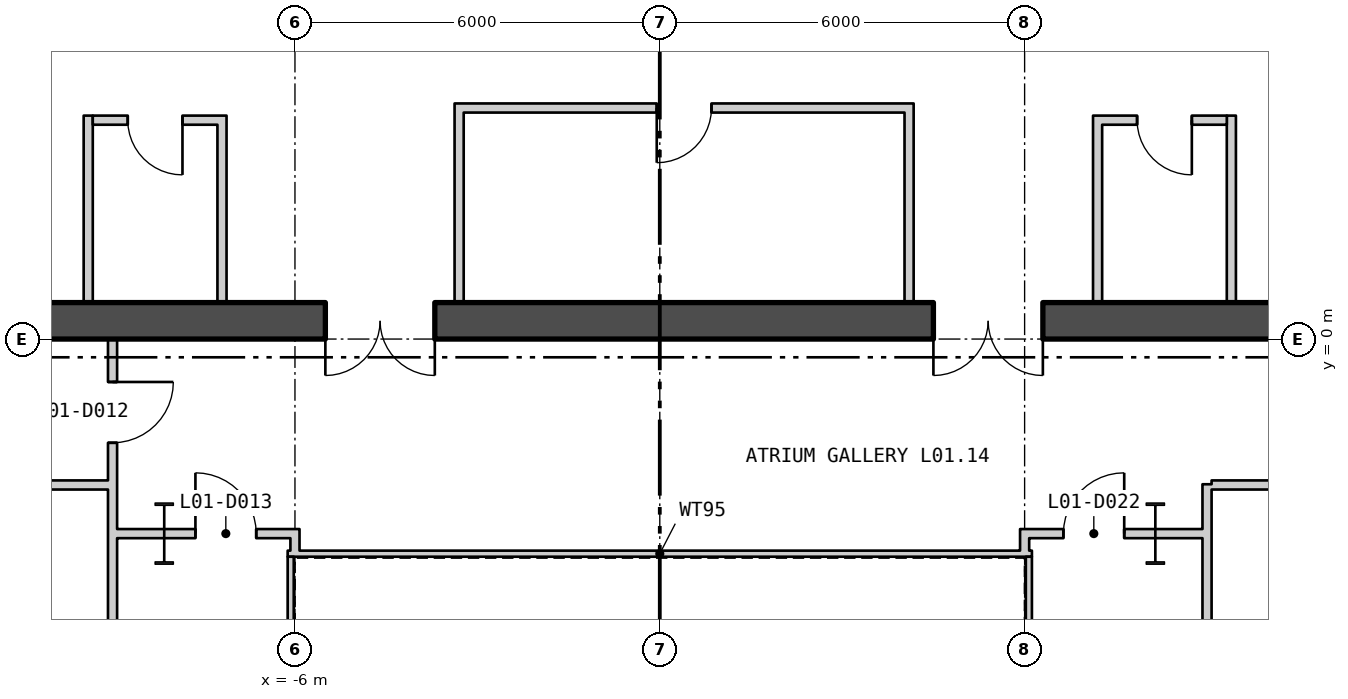
"""IFC4 building model, lengths in metres.
Left out: names, types, materials, properties, quantities, classifications, styles, units other than length and angle.
Written with IfcOpenShell. Run it as: python <this file> out.ifc"""

import sys

from ifc_helpers import new_model, si_unit, direction, frame, frame_2d, origin, origin_2d, place, context, subcontext, project, spatial, rectangle, i_section, extrude, element, fill, save


model = new_model("IFC4")
c1 = context("Model", 3, precision=1e-05, world=origin(), true_north=direction((0.0, 1.0)))
c2 = subcontext(c1, "Body", "Model", "MODEL_VIEW")
j1 = project(units=[si_unit("LENGTHUNIT", "METRE"), si_unit("PLANEANGLEUNIT", "RADIAN")], contexts=[c1])
p1 = place(None, origin())
s1 = spatial("IfcSite", under=j1, at=p1, CompositionType="ELEMENT")
p2 = place(p1, origin())
s2 = spatial("IfcBuilding", under=s1, at=p2, CompositionType="ELEMENT")
p3 = place(p2, frame((0.0, 0.0, 8.4)))
s3 = spatial("IfcBuildingStorey", under=s2, at=p3, CompositionType="ELEMENT", Elevation=8.4)
for number, where, z_axis, x_axis in (
    (1, (8.15, -3.2, 0.0), (0.0, 0.0, 1.0), (1.0, 0.0, 0.0)),
    (2, (-8.15, -3.2, 0.0), (0.0, 0.0, 1.0), (1.0, 0.0, 0.0)),
):
    element("IfcColumn", number, at=place(p3, frame(where, z_axis=z_axis, x_axis=x_axis)), inside=s3, PredefinedType="COLUMN", context=c2, shape_type="SweptSolid", body=[
        extrude(i_section(OverallWidth=0.302, OverallDepth=1.008, WebThickness=0.021, FlangeThickness=0.04, at=origin_2d()), origin(), (0.0, 0.0, 1.0), 5.1),
    ])
p4 = place(p3, frame((6.07, -11.62, 0.0), z_axis=(0.0, 0.0, 1.0), x_axis=(0.0, 1.0, 0.0)))
e3 = element("IfcWall", 3, at=p4, inside=s3, PredefinedType="PARTITIONING", context=c2, shape_type="SweptSolid", body=[
    extrude(rectangle(XDim=8.04, YDim=0.1, at=frame_2d((4.02, 0.0))), origin(), (0.0, 0.0, 1.0), 4.88),
])
p5 = place(p3, frame((6.12, -3.53, 0.0), z_axis=(0.0, 0.0, 1.0), x_axis=(-1.0, 0.0, 0.0)))
e4 = element("IfcWall", 4, at=p5, inside=s3, PredefinedType="PARTITIONING", context=c2, shape_type="SweptSolid", body=[
    extrude(rectangle(XDim=12.24, YDim=0.1, at=frame_2d((6.12, 0.0))), origin(), (0.0, 0.0, 1.0), 4.88),
])
p6 = place(p3, frame((-6.07, -3.58, 0.0), z_axis=(0.0, 0.0, 1.0), x_axis=(0.0, -1.0, 0.0)))
e5 = element("IfcWall", 5, at=p6, inside=s3, PredefinedType="PARTITIONING", context=c2, shape_type="SweptSolid", body=[
    extrude(rectangle(XDim=8.04, YDim=0.1, at=frame_2d((4.02, 0.0))), origin(), (0.0, 0.0, 1.0), 4.88),
])
p7 = place(p3, frame((-17.5, 0.3, 0.0), z_axis=(0.0, 0.0, 1.0), x_axis=(1.0, 0.0, 0.0)))
e6 = element("IfcWall", 6, at=p7, inside=s3, PredefinedType="SHEAR", context=c2, shape_type="SweptSolid", body=[
    extrude(rectangle(XDim=35.0, YDim=0.6, at=frame_2d((17.5, 0.0))), origin(), (0.0, 0.0, 1.0), 4.88),
])
p8 = place(p7, frame((12.0, 0.0, 0.0)))
e7 = element("IfcOpeningElement", 7, at=p8, cuts=e6, PredefinedType="OPENING", context=c2, shape_type="SweptSolid", body=[
    extrude(rectangle(XDim=1.8, YDim=2.4, at=frame_2d((0.9, 1.2))), frame((0.0, 0.31, 0.0), z_axis=(0.0, -1.0, 0.0), x_axis=(1.0, 0.0, 0.0)), (0.0, 0.0, 1.0), 0.62),
])
p9 = place(p7, frame((22.0, 0.0, 0.0)))
e8 = element("IfcOpeningElement", 8, at=p9, cuts=e6, PredefinedType="OPENING", context=c2, shape_type="SweptSolid", body=[
    extrude(rectangle(XDim=1.8, YDim=2.4, at=frame_2d((0.9, 1.2))), frame((0.0, 0.31, 0.0), z_axis=(0.0, -1.0, 0.0), x_axis=(1.0, 0.0, 0.0)), (0.0, 0.0, 1.0), 0.62),
])
for number, where, z_axis, x_axis in (
    (9, (7.2, 0.6, 0.0), (0.0, 0.0, 1.0), (0.0, 1.0, 0.0)),
    (10, (9.4, 0.6, 0.0), (0.0, 0.0, 1.0), (0.0, 1.0, 0.0)),
):
    element("IfcWall", number, at=place(p3, frame(where, z_axis=z_axis, x_axis=x_axis)), inside=s3, PredefinedType="PARTITIONING", context=c2, shape_type="SweptSolid", body=[
        extrude(rectangle(XDim=3.075, YDim=0.15, at=frame_2d((1.538, 0.0))), origin(), (0.0, 0.0, 1.0), 4.88),
    ])
p10 = place(p3, frame((7.275, 3.6, 0.0), z_axis=(0.0, 0.0, 1.0), x_axis=(1.0, 0.0, 0.0)))
e11 = element("IfcWall", 11, at=p10, inside=s3, PredefinedType="PARTITIONING", context=c2, shape_type="SweptSolid", body=[
    extrude(rectangle(XDim=2.05, YDim=0.15, at=frame_2d((1.025, 0.0))), origin(), (0.0, 0.0, 1.0), 4.88),
])
p11 = place(p10, frame((0.575, 0.0, 0.0)))
e12 = element("IfcOpeningElement", 12, at=p11, cuts=e11, PredefinedType="OPENING", context=c2, shape_type="SweptSolid", body=[
    extrude(rectangle(XDim=0.9, YDim=2.1, at=frame_2d((0.45, 1.05))), frame((0.0, 0.085, 0.0), z_axis=(0.0, -1.0, 0.0), x_axis=(1.0, 0.0, 0.0)), (0.0, 0.0, 1.0), 0.17),
])
for number, where, z_axis, x_axis in (
    (13, (-3.3, 0.6, 0.0), (0.0, 0.0, 1.0), (0.0, 1.0, 0.0)),
    (14, (4.1, 0.6, 0.0), (0.0, 0.0, 1.0), (0.0, 1.0, 0.0)),
):
    element("IfcWall", number, at=place(p3, frame(where, z_axis=z_axis, x_axis=x_axis)), inside=s3, PredefinedType="PARTITIONING", context=c2, shape_type="SweptSolid", body=[
        extrude(rectangle(XDim=3.275, YDim=0.15, at=frame_2d((1.637, 0.0))), origin(), (0.0, 0.0, 1.0), 4.88),
    ])
p12 = place(p3, frame((-3.225, 3.8, 0.0), z_axis=(0.0, 0.0, 1.0), x_axis=(1.0, 0.0, 0.0)))
e15 = element("IfcWall", 15, at=p12, inside=s3, PredefinedType="PARTITIONING", context=c2, shape_type="SweptSolid", body=[
    extrude(rectangle(XDim=7.25, YDim=0.15, at=frame_2d((3.625, 0.0))), origin(), (0.0, 0.0, 1.0), 4.88),
])
p13 = place(p12, frame((3.175, 0.0, 0.0)))
e16 = element("IfcOpeningElement", 16, at=p13, cuts=e15, PredefinedType="OPENING", context=c2, shape_type="SweptSolid", body=[
    extrude(rectangle(XDim=0.9, YDim=2.1, at=frame_2d((0.45, 1.05))), frame((0.0, 0.085, 0.0), z_axis=(0.0, -1.0, 0.0), x_axis=(1.0, 0.0, 0.0)), (0.0, 0.0, 1.0), 0.17),
])
for number, where, z_axis, x_axis in (
    (17, (-9.4, 0.6, 0.0), (0.0, 0.0, 1.0), (0.0, 1.0, 0.0)),
    (18, (-7.2, 0.6, 0.0), (0.0, 0.0, 1.0), (0.0, 1.0, 0.0)),
):
    element("IfcWall", number, at=place(p3, frame(where, z_axis=z_axis, x_axis=x_axis)), inside=s3, PredefinedType="PARTITIONING", context=c2, shape_type="SweptSolid", body=[
        extrude(rectangle(XDim=3.075, YDim=0.15, at=frame_2d((1.538, 0.0))), origin(), (0.0, 0.0, 1.0), 4.88),
    ])
p14 = place(p3, frame((-9.325, 3.6, 0.0), z_axis=(0.0, 0.0, 1.0), x_axis=(1.0, 0.0, 0.0)))
e19 = element("IfcWall", 19, at=p14, inside=s3, PredefinedType="PARTITIONING", context=c2, shape_type="SweptSolid", body=[
    extrude(rectangle(XDim=2.05, YDim=0.15, at=frame_2d((1.025, 0.0))), origin(), (0.0, 0.0, 1.0), 4.88),
])
p15 = place(p14, frame((0.575, 0.0, 0.0)))
e20 = element("IfcOpeningElement", 20, at=p15, cuts=e19, PredefinedType="OPENING", context=c2, shape_type="SweptSolid", body=[
    extrude(rectangle(XDim=0.9, YDim=2.1, at=frame_2d((0.45, 1.05))), frame((0.0, 0.085, 0.0), z_axis=(0.0, -1.0, 0.0), x_axis=(1.0, 0.0, 0.0)), (0.0, 0.0, 1.0), 0.17),
])
p16 = place(p3, frame((-17.025, -2.4, 0.0), z_axis=(0.0, 0.0, 1.0), x_axis=(1.0, 0.0, 0.0)))
e21 = element("IfcWall", 21, at=p16, inside=s3, PredefinedType="PARTITIONING", context=c2, shape_type="SweptSolid", body=[
    extrude(rectangle(XDim=7.95, YDim=0.15, at=frame_2d((3.975, 0.0))), origin(), (0.0, 0.0, 1.0), 4.88),
])
p17 = place(p16, frame((5.621, 0.0, 0.0)))
e22 = element("IfcOpeningElement", 22, at=p17, cuts=e21, PredefinedType="OPENING", context=c2, shape_type="SweptSolid", body=[
    extrude(rectangle(XDim=1.0, YDim=2.1, at=frame_2d((0.5, 1.05))), frame((0.0, 0.085, 0.0), z_axis=(0.0, -1.0, 0.0), x_axis=(1.0, 0.0, 0.0)), (0.0, 0.0, 1.0), 0.17),
])
p18 = place(p3, frame((-9.0, -13.675, 0.0), z_axis=(0.0, 0.0, 1.0), x_axis=(0.0, 1.0, 0.0)))
e23 = element("IfcWall", 23, at=p18, inside=s3, PredefinedType="PARTITIONING", context=c2, shape_type="SweptSolid", body=[
    extrude(rectangle(XDim=13.675, YDim=0.15, at=frame_2d((6.838, 0.0))), origin(), (0.0, 0.0, 1.0), 4.88),
])
p19 = place(p18, frame((11.969, 0.0, 0.0)))
e24 = element("IfcOpeningElement", 24, at=p19, cuts=e23, PredefinedType="OPENING", context=c2, shape_type="SweptSolid", body=[
    extrude(rectangle(XDim=1.0, YDim=2.1, at=frame_2d((0.5, 1.05))), frame((0.0, 0.085, 0.0), z_axis=(0.0, -1.0, 0.0), x_axis=(1.0, 0.0, 0.0)), (0.0, 0.0, 1.0), 0.17),
])
p20 = place(p3, frame((-8.925, -3.2, 0.0), z_axis=(0.0, 0.0, 1.0), x_axis=(1.0, 0.0, 0.0)))
e25 = element("IfcWall", 25, at=p20, inside=s3, PredefinedType="PARTITIONING", context=c2, shape_type="SweptSolid", body=[
    extrude(rectangle(XDim=0.775, YDim=0.15, at=frame_2d((0.388, 0.0))), origin(), (0.0, 0.0, 1.0), 4.09),
])
p21 = place(p3, frame((-8.15, -3.2, 0.0), z_axis=(0.0, 0.0, 1.0), x_axis=(1.0, 0.0, 0.0)))
e26 = element("IfcWall", 26, at=p21, inside=s3, PredefinedType="PARTITIONING", context=c2, shape_type="SweptSolid", body=[
    extrude(rectangle(XDim=2.225, YDim=0.15, at=frame_2d((1.113, 0.0))), origin(), (0.0, 0.0, 1.0), 3.97),
])
p22 = place(p21, frame((0.513, 0.0, 0.0)))
e27 = element("IfcOpeningElement", 27, at=p22, cuts=e26, PredefinedType="OPENING", context=c2, shape_type="SweptSolid", body=[
    extrude(rectangle(XDim=1.0, YDim=2.1, at=frame_2d((0.5, 1.05))), frame((0.0, 0.085, 0.0), z_axis=(0.0, -1.0, 0.0), x_axis=(1.0, 0.0, 0.0)), (0.0, 0.0, 1.0), 0.17),
])
p23 = place(p3, frame((-6.0, -3.48, 0.0), z_axis=(0.0, 0.0, 1.0), x_axis=(0.0, 1.0, 0.0)))
e28 = element("IfcWall", 28, at=p23, inside=s3, PredefinedType="PARTITIONING", context=c2, shape_type="SweptSolid", body=[
    extrude(rectangle(XDim=0.205, YDim=0.15, at=frame_2d((0.102, 0.0))), origin(), (0.0, 0.0, 1.0), 4.88),
])
p24 = place(p3, frame((5.925, -3.2, 0.0), z_axis=(0.0, 0.0, 1.0), x_axis=(1.0, 0.0, 0.0)))
e29 = element("IfcWall", 29, at=p24, inside=s3, PredefinedType="PARTITIONING", context=c2, shape_type="SweptSolid", body=[
    extrude(rectangle(XDim=2.225, YDim=0.15, at=frame_2d((1.113, 0.0))), origin(), (0.0, 0.0, 1.0), 3.97),
])
p25 = place(p24, frame((0.713, 0.0, 0.0)))
e30 = element("IfcOpeningElement", 30, at=p25, cuts=e29, PredefinedType="OPENING", context=c2, shape_type="SweptSolid", body=[
    extrude(rectangle(XDim=1.0, YDim=2.1, at=frame_2d((0.5, 1.05))), frame((0.0, 0.085, 0.0), z_axis=(0.0, -1.0, 0.0), x_axis=(1.0, 0.0, 0.0)), (0.0, 0.0, 1.0), 0.17),
])
p26 = place(p3, frame((8.15, -3.2, 0.0), z_axis=(0.0, 0.0, 1.0), x_axis=(1.0, 0.0, 0.0)))
e31 = element("IfcWall", 31, at=p26, inside=s3, PredefinedType="PARTITIONING", context=c2, shape_type="SweptSolid", body=[
    extrude(rectangle(XDim=0.775, YDim=0.15, at=frame_2d((0.388, 0.0))), origin(), (0.0, 0.0, 1.0), 4.09),
])
p27 = place(p3, frame((6.0, -3.48, 0.0), z_axis=(0.0, 0.0, 1.0), x_axis=(0.0, 1.0, 0.0)))
e32 = element("IfcWall", 32, at=p27, inside=s3, PredefinedType="PARTITIONING", context=c2, shape_type="SweptSolid", body=[
    extrude(rectangle(XDim=0.205, YDim=0.15, at=frame_2d((0.102, 0.0))), origin(), (0.0, 0.0, 1.0), 4.88),
])
p28 = place(p3, frame((9.0, -13.675, 0.0), z_axis=(0.0, 0.0, 1.0), x_axis=(0.0, 1.0, 0.0)))
e33 = element("IfcWall", 33, at=p28, inside=s3, PredefinedType="PARTITIONING", context=c2, shape_type="SweptSolid", body=[
    extrude(rectangle(XDim=11.287, YDim=0.15, at=frame_2d((5.644, 0.0))), origin(), (0.0, 0.0, 1.0), 4.88),
])
p29 = place(p28, frame((2.498, 0.0, 0.0)))
e34 = element("IfcOpeningElement", 34, at=p29, cuts=e33, PredefinedType="OPENING", context=c2, shape_type="SweptSolid", body=[
    extrude(rectangle(XDim=1.8, YDim=2.1, at=frame_2d((0.9, 1.05))), frame((0.0, 0.085, 0.0), z_axis=(0.0, -1.0, 0.0), x_axis=(1.0, 0.0, 0.0)), (0.0, 0.0, 1.0), 0.17),
])
p30 = place(p3, frame((9.075, -2.4, 0.0), z_axis=(0.0, 0.0, 1.0), x_axis=(1.0, 0.0, 0.0)))
e35 = element("IfcWall", 35, at=p30, inside=s3, PredefinedType="PARTITIONING", context=c2, shape_type="SweptSolid", body=[
    extrude(rectangle(XDim=7.95, YDim=0.15, at=frame_2d((3.975, 0.0))), origin(), (0.0, 0.0, 1.0), 4.88),
])
p31 = place(p30, frame((1.329, 0.0, 0.0)))
e36 = element("IfcOpeningElement", 36, at=p31, cuts=e35, PredefinedType="OPENING", context=c2, shape_type="SweptSolid", body=[
    extrude(rectangle(XDim=1.0, YDim=2.1, at=frame_2d((0.5, 1.05))), frame((0.0, 0.085, 0.0), z_axis=(0.0, -1.0, 0.0), x_axis=(1.0, 0.0, 0.0)), (0.0, 0.0, 1.0), 0.17),
])
p32 = place(p30, frame((5.279, 0.0, 0.0)))
e37 = element("IfcOpeningElement", 37, at=p32, cuts=e35, PredefinedType="OPENING", context=c2, shape_type="SweptSolid", body=[
    extrude(rectangle(XDim=1.0, YDim=2.1, at=frame_2d((0.5, 1.05))), frame((0.0, 0.085, 0.0), z_axis=(0.0, -1.0, 0.0), x_axis=(1.0, 0.0, 0.0)), (0.0, 0.0, 1.0), 0.17),
])
p33 = place(p11, origin())
e38 = element("IfcDoor", 38, at=p33, inside=s3, OperationType="SINGLE_SWING_RIGHT", PredefinedType="DOOR", context=c2, shape_type="SweptSolid", body=[
    extrude(rectangle(XDim=0.9, YDim=2.1, at=frame_2d((0.45, 1.05))), frame((0.0, 0.025, 0.0), z_axis=(0.0, -1.0, 0.0), x_axis=(1.0, 0.0, 0.0)), (0.0, 0.0, 1.0), 0.05),
])
fill(e12, e38)
p34 = place(p13, origin())
e39 = element("IfcDoor", 39, at=p34, inside=s3, OperationType="SINGLE_SWING_LEFT", PredefinedType="DOOR", context=c2, shape_type="SweptSolid", body=[
    extrude(rectangle(XDim=0.9, YDim=2.1, at=frame_2d((0.45, 1.05))), frame((0.0, 0.025, 0.0), z_axis=(0.0, -1.0, 0.0), x_axis=(1.0, 0.0, 0.0)), (0.0, 0.0, 1.0), 0.05),
])
fill(e16, e39)
p35 = place(p15, origin())
e40 = element("IfcDoor", 40, at=p35, inside=s3, OperationType="SINGLE_SWING_RIGHT", PredefinedType="DOOR", context=c2, shape_type="SweptSolid", body=[
    extrude(rectangle(XDim=0.9, YDim=2.1, at=frame_2d((0.45, 1.05))), frame((0.0, 0.025, 0.0), z_axis=(0.0, -1.0, 0.0), x_axis=(1.0, 0.0, 0.0)), (0.0, 0.0, 1.0), 0.05),
])
fill(e20, e40)
p36 = place(p8, origin())
e41 = element("IfcDoor", 41, at=p36, inside=s3, OperationType="DOUBLE_DOOR_SINGLE_SWING", PredefinedType="DOOR", context=c2, shape_type="SweptSolid", body=[
    extrude(rectangle(XDim=1.8, YDim=2.4, at=frame_2d((0.9, 1.2))), frame((0.0, 0.025, 0.0), z_axis=(0.0, -1.0, 0.0), x_axis=(1.0, 0.0, 0.0)), (0.0, 0.0, 1.0), 0.05),
])
fill(e7, e41)
p37 = place(p9, origin())
e42 = element("IfcDoor", 42, at=p37, inside=s3, OperationType="DOUBLE_DOOR_SINGLE_SWING", PredefinedType="DOOR", context=c2, shape_type="SweptSolid", body=[
    extrude(rectangle(XDim=1.8, YDim=2.4, at=frame_2d((0.9, 1.2))), frame((0.0, 0.025, 0.0), z_axis=(0.0, -1.0, 0.0), x_axis=(1.0, 0.0, 0.0)), (0.0, 0.0, 1.0), 0.05),
])
fill(e8, e42)
p38 = place(p19, origin())
e43 = element("IfcDoor", 43, at=p38, inside=s3, OperationType="SINGLE_SWING_RIGHT", PredefinedType="DOOR", context=c2, shape_type="SweptSolid", body=[
    extrude(rectangle(XDim=1.0, YDim=2.1, at=frame_2d((0.5, 1.05))), frame((0.0, 0.025, 0.0), z_axis=(0.0, -1.0, 0.0), x_axis=(1.0, 0.0, 0.0)), (0.0, 0.0, 1.0), 0.05),
])
fill(e24, e43)
p39 = place(p22, origin())
e44 = element("IfcDoor", 44, at=p39, inside=s3, OperationType="SINGLE_SWING_RIGHT", PredefinedType="DOOR", context=c2, shape_type="SweptSolid", body=[
    extrude(rectangle(XDim=1.0, YDim=2.1, at=frame_2d((0.5, 1.05))), frame((0.0, 0.025, 0.0), z_axis=(0.0, -1.0, 0.0), x_axis=(1.0, 0.0, 0.0)), (0.0, 0.0, 1.0), 0.05),
])
fill(e27, e44)
p40 = place(p25, origin())
e45 = element("IfcDoor", 45, at=p40, inside=s3, OperationType="SINGLE_SWING_LEFT", PredefinedType="DOOR", context=c2, shape_type="SweptSolid", body=[
    extrude(rectangle(XDim=1.0, YDim=2.1, at=frame_2d((0.5, 1.05))), frame((0.0, 0.025, 0.0), z_axis=(0.0, -1.0, 0.0), x_axis=(1.0, 0.0, 0.0)), (0.0, 0.0, 1.0), 0.05),
])
fill(e30, e45)
save(model, sys.argv[1])
